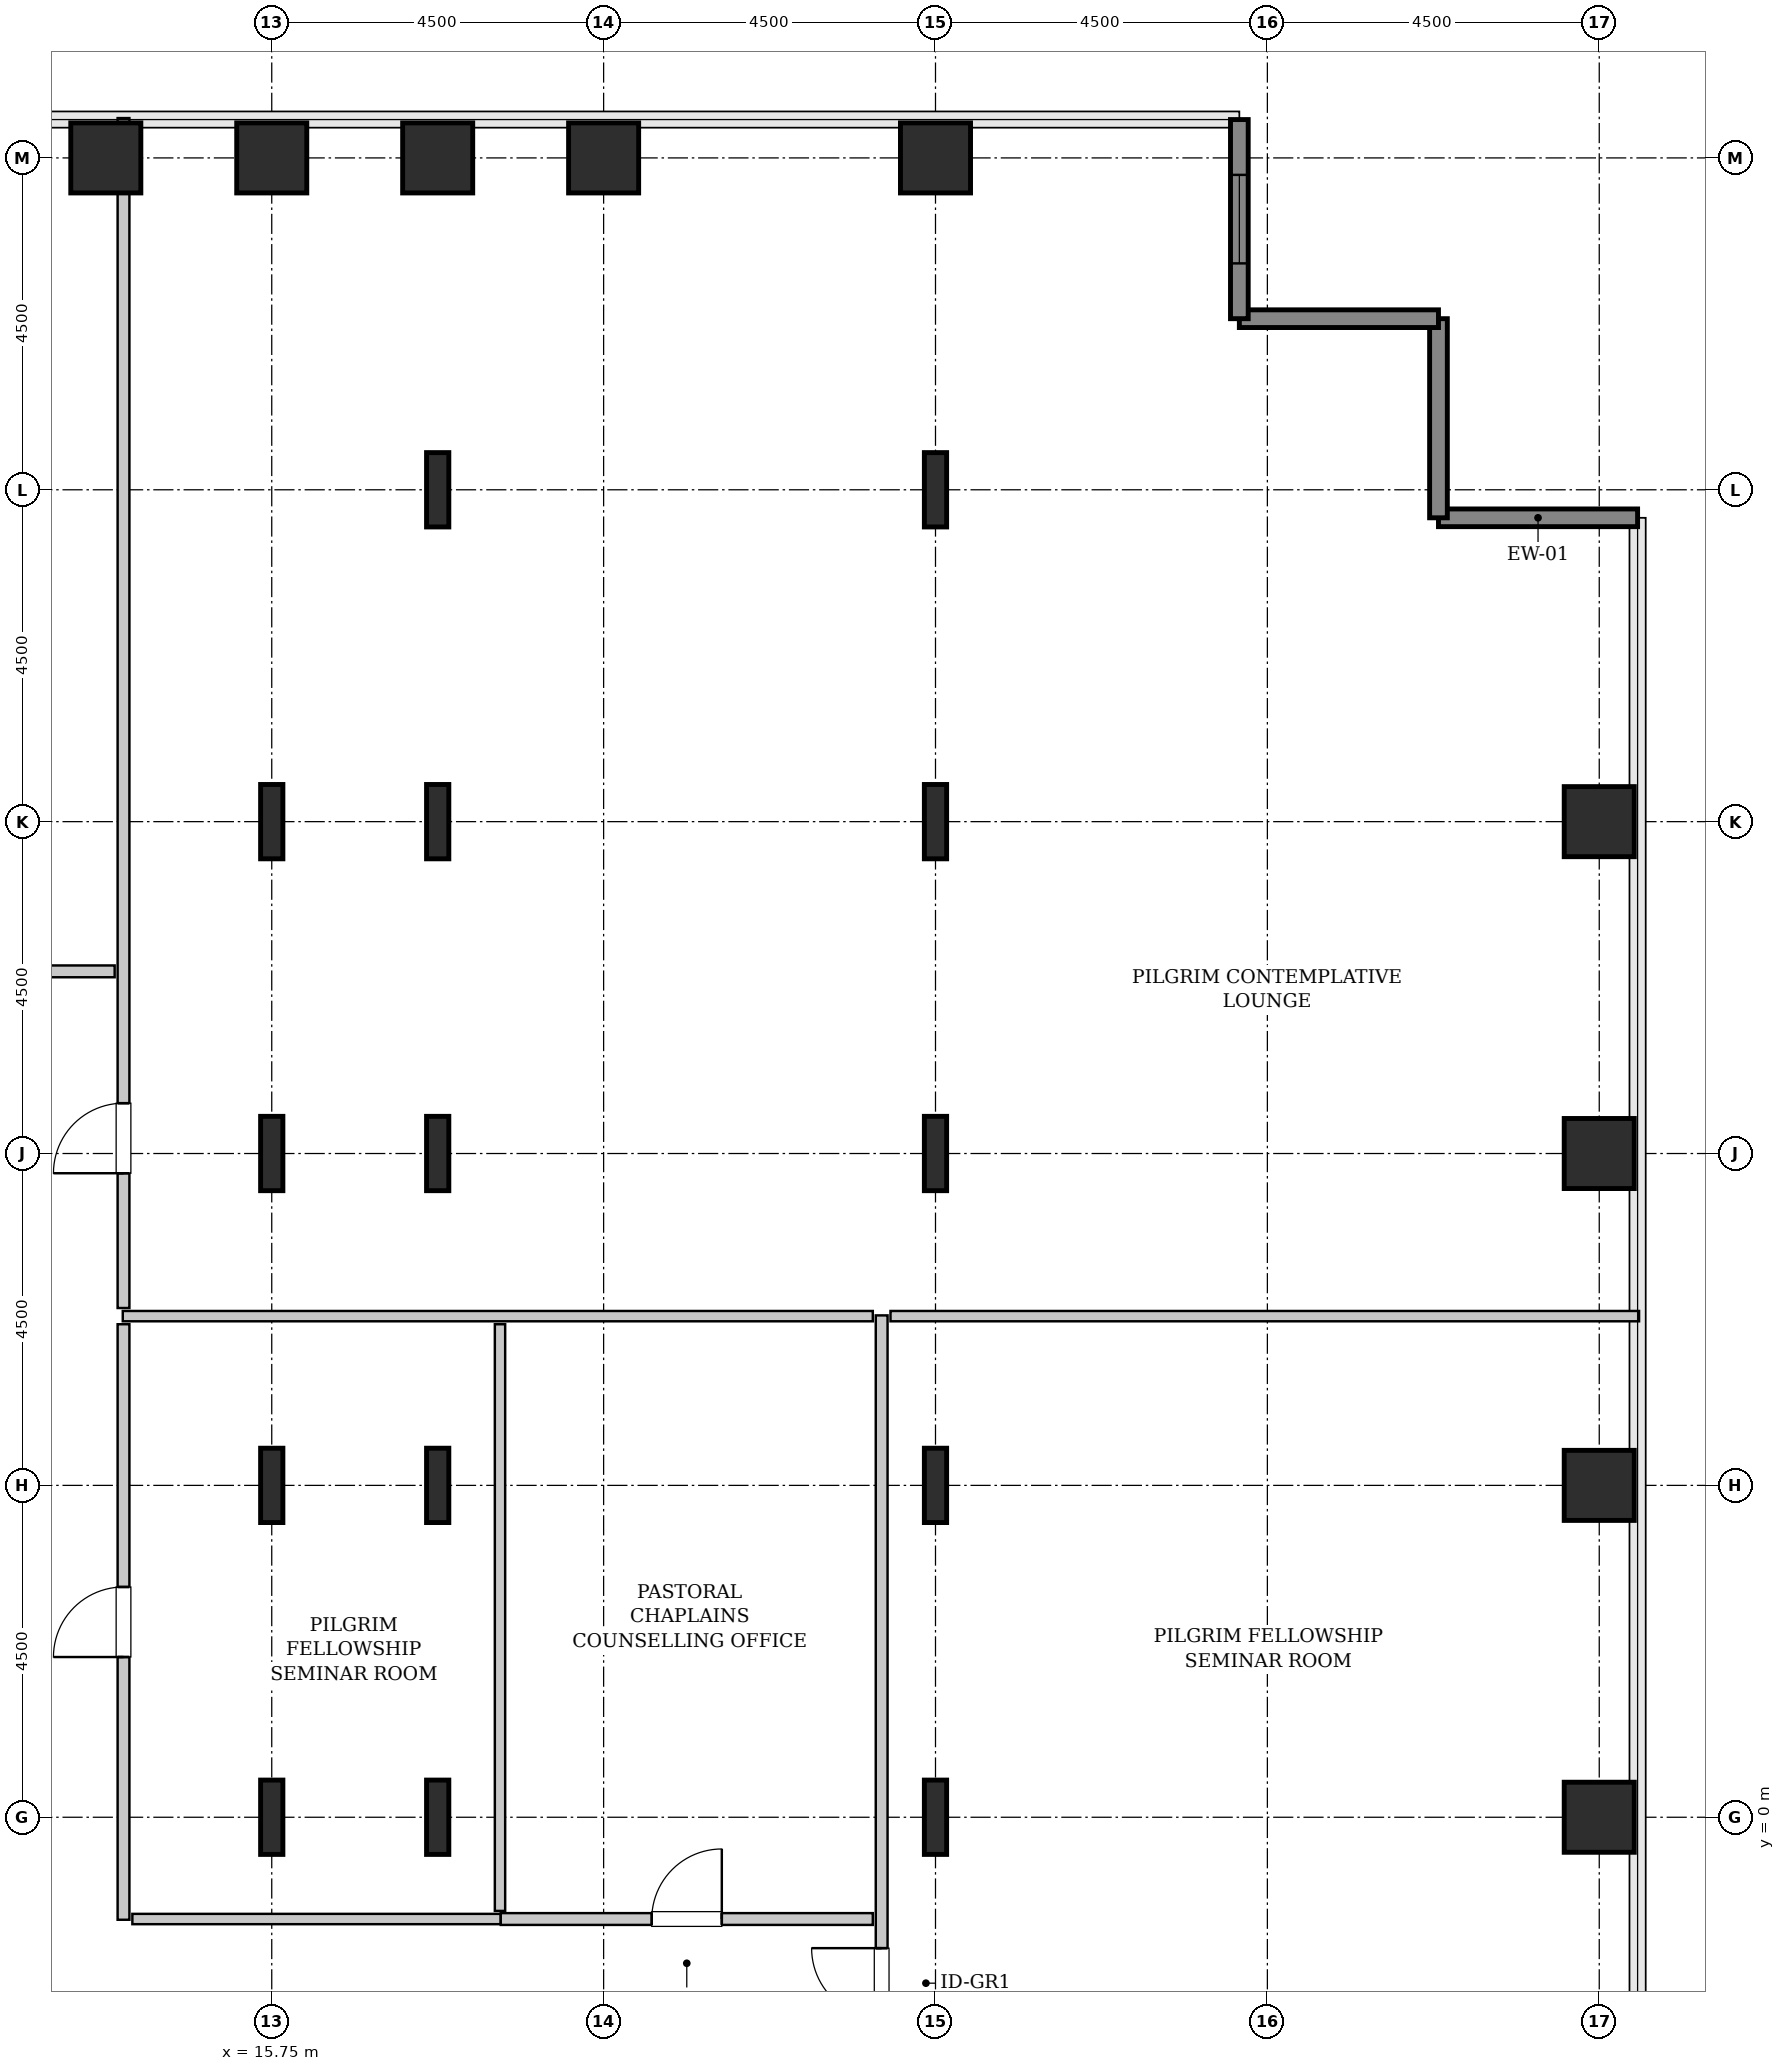
"""IFC4 building model, lengths in metres.
Left out: names, types, materials, properties, quantities, classifications, styles, units other than length and angle.
Written with IfcOpenShell. Run it as: python <this file> out.ifc"""

import sys

from ifc_helpers import new_model, si_unit, direction, frame, frame_2d, origin, origin_2d, place, context, subcontext, project, spatial, rectangle, hollow_rectangle, i_section, extrude, source, transform, mapped, element, fill, save


model = new_model("IFC4")
c1 = context("Model", 3, precision=1e-05, world=origin(), true_north=direction((0.0, 1.0)))
c2 = subcontext(c1, "Body", "Model", "MODEL_VIEW")
j1 = project(units=[si_unit("LENGTHUNIT", "METRE"), si_unit("PLANEANGLEUNIT", "RADIAN")], contexts=[c1])
p1 = place(None, origin())
s1 = spatial("IfcSite", under=j1, at=p1, CompositionType="ELEMENT")
p2 = place(p1, origin())
s2 = spatial("IfcBuilding", under=s1, at=p2, CompositionType="ELEMENT")
p3 = place(p2, frame((0.0, 0.0, 98.4)))
s3 = spatial("IfcBuildingStorey", under=s2, at=p3, CompositionType="ELEMENT", Elevation=98.4)
m1 = source(origin(), c2, "Body", "SweptSolid", [
    extrude(hollow_rectangle(XDim=0.95, YDim=0.95, WallThickness=0.045, InnerFilletRadius=0.045, OuterFilletRadius=0.09, at=origin_2d()), origin(), (0.0, 0.0, 1.0), 3.8),
])
p4 = place(p3, frame((13.5, 22.5, 0.0), z_axis=(0.0, 0.0, 1.0), x_axis=(1.0, 0.0, 0.0)))
e1 = element("IfcColumn", 1, at=p4, inside=s3, PredefinedType="COLUMN", context=c2, shape_type="MappedRepresentation", body=[
    mapped(m1, transform((0.0, 0.0, 0.0), x_axis=(1.0, 0.0, 0.0), y_axis=(0.0, 1.0, 0.0), z_axis=(0.0, 0.0, 1.0), scale=1.0)),
])
m2 = source(origin(), c2, "Body", "SweptSolid", [
    extrude(i_section(OverallWidth=0.302, OverallDepth=1.008, WebThickness=0.021, FlangeThickness=0.04, FilletRadius=0.03, at=origin_2d()), origin(), (0.0, 0.0, 1.0), 3.8),
])
for number, where, z_axis, x_axis in (
    (2, (15.75, 0.0, 0.0), (0.0, 0.0, 1.0), (1.0, 0.0, 0.0)),
    (3, (15.75, 4.5, 0.0), (0.0, 0.0, 1.0), (1.0, 0.0, 0.0)),
    (4, (15.75, 9.0, 0.0), (0.0, 0.0, 1.0), (1.0, 0.0, 0.0)),
    (5, (15.75, 13.5, 0.0), (0.0, 0.0, 1.0), (1.0, 0.0, 0.0)),
):
    element("IfcColumn", number, at=place(p3, frame(where, z_axis=z_axis, x_axis=x_axis)), inside=s3, PredefinedType="COLUMN", context=c2, shape_type="MappedRepresentation", body=[
        mapped(m2, transform((0.0, 0.0, 0.0), x_axis=(1.0, 0.0, 0.0), y_axis=(0.0, 1.0, 0.0), z_axis=(0.0, 0.0, 1.0), scale=1.0)),
    ])
p5 = place(p3, frame((15.75, 22.5, 0.0), z_axis=(0.0, 0.0, 1.0), x_axis=(1.0, 0.0, 0.0)))
e6 = element("IfcColumn", 6, at=p5, inside=s3, PredefinedType="COLUMN", context=c2, shape_type="MappedRepresentation", body=[
    mapped(m1, transform((0.0, 0.0, 0.0), x_axis=(1.0, 0.0, 0.0), y_axis=(0.0, 1.0, 0.0), z_axis=(0.0, 0.0, 1.0), scale=1.0)),
])
for number, where, z_axis, x_axis in (
    (7, (18.0, 0.0, 0.0), (0.0, 0.0, 1.0), (1.0, 0.0, 0.0)),
    (8, (18.0, 4.5, 0.0), (0.0, 0.0, 1.0), (1.0, 0.0, 0.0)),
    (9, (18.0, 9.0, 0.0), (0.0, 0.0, 1.0), (1.0, 0.0, 0.0)),
    (10, (18.0, 13.5, 0.0), (0.0, 0.0, 1.0), (1.0, 0.0, 0.0)),
    (11, (18.0, 18.0, 0.0), (0.0, 0.0, 1.0), (1.0, 0.0, 0.0)),
):
    element("IfcColumn", number, at=place(p3, frame(where, z_axis=z_axis, x_axis=x_axis)), inside=s3, PredefinedType="COLUMN", context=c2, shape_type="MappedRepresentation", body=[
        mapped(m2, transform((0.0, 0.0, 0.0), x_axis=(1.0, 0.0, 0.0), y_axis=(0.0, 1.0, 0.0), z_axis=(0.0, 0.0, 1.0), scale=1.0)),
    ])
for number, where, z_axis, x_axis in (
    (12, (18.0, 22.5, 0.0), (0.0, 0.0, 1.0), (1.0, 0.0, 0.0)),
    (13, (20.25, 22.5, 0.0), (0.0, 0.0, 1.0), (1.0, 0.0, 0.0)),
):
    element("IfcColumn", number, at=place(p3, frame(where, z_axis=z_axis, x_axis=x_axis)), inside=s3, PredefinedType="COLUMN", context=c2, shape_type="MappedRepresentation", body=[
        mapped(m1, transform((0.0, 0.0, 0.0), x_axis=(1.0, 0.0, 0.0), y_axis=(0.0, 1.0, 0.0), z_axis=(0.0, 0.0, 1.0), scale=1.0)),
    ])
for number, where, z_axis, x_axis in (
    (14, (24.75, 0.0, 0.0), (0.0, 0.0, 1.0), (1.0, 0.0, 0.0)),
    (15, (24.75, 4.5, 0.0), (0.0, 0.0, 1.0), (1.0, 0.0, 0.0)),
    (16, (24.75, 9.0, 0.0), (0.0, 0.0, 1.0), (1.0, 0.0, 0.0)),
    (17, (24.75, 13.5, 0.0), (0.0, 0.0, 1.0), (1.0, 0.0, 0.0)),
    (18, (24.75, 18.0, 0.0), (0.0, 0.0, 1.0), (1.0, 0.0, 0.0)),
):
    element("IfcColumn", number, at=place(p3, frame(where, z_axis=z_axis, x_axis=x_axis)), inside=s3, PredefinedType="COLUMN", context=c2, shape_type="MappedRepresentation", body=[
        mapped(m2, transform((0.0, 0.0, 0.0), x_axis=(1.0, 0.0, 0.0), y_axis=(0.0, 1.0, 0.0), z_axis=(0.0, 0.0, 1.0), scale=1.0)),
    ])
for number, where, z_axis, x_axis in (
    (19, (24.75, 22.5, 0.0), (0.0, 0.0, 1.0), (1.0, 0.0, 0.0)),
    (20, (33.75, 0.0, 0.0), (0.0, 0.0, 1.0), (1.0, 0.0, 0.0)),
    (21, (33.75, 4.5, 0.0), (0.0, 0.0, 1.0), (1.0, 0.0, 0.0)),
    (22, (33.75, 9.0, 0.0), (0.0, 0.0, 1.0), (1.0, 0.0, 0.0)),
    (23, (33.75, 13.5, 0.0), (0.0, 0.0, 1.0), (1.0, 0.0, 0.0)),
):
    element("IfcColumn", number, at=place(p3, frame(where, z_axis=z_axis, x_axis=x_axis)), inside=s3, PredefinedType="COLUMN", context=c2, shape_type="MappedRepresentation", body=[
        mapped(m1, transform((0.0, 0.0, 0.0), x_axis=(1.0, 0.0, 0.0), y_axis=(0.0, 1.0, 0.0), z_axis=(0.0, 0.0, 1.0), scale=1.0)),
    ])
m3 = source(origin(), c2, "Body", "SweptSolid", [
    extrude(rectangle(XDim=2.7, YDim=0.24, at=frame_2d((1.35, 0.0))), origin(), (0.0, 0.0, 1.0), 3.55),
])
for number, where, z_axis, x_axis in (
    (24, (34.27, 17.62, 0.0), (0.0, 0.0, 1.0), (-1.0, 0.0, 0.0)),
    (25, (31.57, 17.62, 0.0), (0.0, 0.0, 1.0), (0.0, 1.0, 0.0)),
    (26, (31.57, 20.32, 0.0), (0.0, 0.0, 1.0), (-1.0, 0.0, 0.0)),
):
    element("IfcWall", number, at=place(p3, frame(where, z_axis=z_axis, x_axis=x_axis)), inside=s3, PredefinedType="SHEAR", context=c2, shape_type="MappedRepresentation", body=[
        mapped(m3, transform((0.0, 0.0, 0.0), x_axis=(1.0, 0.0, 0.0), y_axis=(0.0, 1.0, 0.0), z_axis=(0.0, 0.0, 1.0), scale=1.0)),
    ])
p6 = place(p3, frame((28.87, 20.32, 0.0), z_axis=(0.0, 0.0, 1.0), x_axis=(0.0, 1.0, 0.0)))
e27 = element("IfcWall", 27, at=p6, inside=s3, PredefinedType="SHEAR", context=c2, shape_type="MappedRepresentation", body=[
    mapped(m3, transform((0.0, 0.0, 0.0), x_axis=(1.0, 0.0, 0.0), y_axis=(0.0, 1.0, 0.0), z_axis=(0.0, 0.0, 1.0), scale=1.0)),
])
p7 = place(p6, frame((0.75, 0.0, 0.85)))
e28 = element("IfcOpeningElement", 28, at=p7, cuts=e27, PredefinedType="OPENING", context=c2, shape_type="SweptSolid", body=[
    extrude(rectangle(XDim=1.2, YDim=1.8, at=frame_2d((0.6, 0.9))), frame((0.0, 0.13, 0.0), z_axis=(0.0, -1.0, 0.0), x_axis=(1.0, 0.0, 0.0)), (0.0, 0.0, 1.0), 0.26),
])
m4 = source(origin(), c2, "Body", "SweptSolid", [
    extrude(rectangle(XDim=13.5, YDim=0.16, at=frame_2d((6.75, 0.0))), origin(), (0.0, 0.0, 1.0), 3.535),
])
p8 = place(p3, frame((24.02, -6.695, 0.0), z_axis=(0.0, 0.0, 1.0), x_axis=(0.0, 1.0, 0.0)))
e29 = element("IfcWall", 29, at=p8, inside=s3, PredefinedType="PARTITIONING", context=c2, shape_type="MappedRepresentation", body=[
    mapped(m4, transform((0.0, 0.0, 0.0), x_axis=(1.0, 0.0, 0.0), y_axis=(0.0, 1.0, 0.0), z_axis=(0.0, 0.0, 1.0), scale=1.0)),
])
p9 = place(p8, frame((3.97, 0.0, 0.0)))
e30 = element("IfcOpeningElement", 30, at=p9, cuts=e29, PredefinedType="OPENING", context=c2, shape_type="SweptSolid", body=[
    extrude(rectangle(XDim=0.95, YDim=2.1, at=frame_2d((0.475, 1.05))), frame((0.0, 0.09, 0.0), z_axis=(0.0, -1.0, 0.0), x_axis=(1.0, 0.0, 0.0)), (0.0, 0.0, 1.0), 0.18),
])
m5 = source(origin(), c2, "Body", "SweptSolid", [
    extrude(rectangle(XDim=10.17, YDim=0.14, at=frame_2d((5.085, 0.0))), origin(), (0.0, 0.0, 1.0), 3.535),
])
p10 = place(p3, frame((13.73, 6.795, 0.0), z_axis=(0.0, 0.0, 1.0), x_axis=(1.0, 0.0, 0.0)))
e31 = element("IfcWall", 31, at=p10, inside=s3, PredefinedType="PARTITIONING", context=c2, shape_type="MappedRepresentation", body=[
    mapped(m5, transform((0.0, 0.0, 0.0), x_axis=(1.0, 0.0, 0.0), y_axis=(0.0, 1.0, 0.0), z_axis=(0.0, 0.0, 1.0), scale=1.0)),
])
m6 = source(origin(), c2, "Body", "SweptSolid", [
    extrude(rectangle(XDim=10.15, YDim=0.14, at=frame_2d((5.075, 0.0))), origin(), (0.0, 0.0, 1.0), 3.535),
])
p11 = place(p3, frame((24.14, 6.795, 0.0), z_axis=(0.0, 0.0, 1.0), x_axis=(1.0, 0.0, 0.0)))
e32 = element("IfcWall", 32, at=p11, inside=s3, PredefinedType="PARTITIONING", context=c2, shape_type="MappedRepresentation", body=[
    mapped(m6, transform((0.0, 0.0, 0.0), x_axis=(1.0, 0.0, 0.0), y_axis=(0.0, 1.0, 0.0), z_axis=(0.0, 0.0, 1.0), scale=1.0)),
])
m7 = source(origin(), c2, "Body", "SweptSolid", [
    extrude(rectangle(XDim=8.075, YDim=0.16, at=frame_2d((4.038, 0.0))), origin(), (0.0, 0.0, 1.0), 3.535),
])
p12 = place(p3, frame((13.74, -1.39, 0.0), z_axis=(0.0, 0.0, 1.0), x_axis=(0.0, 1.0, 0.0)))
e33 = element("IfcWall", 33, at=p12, inside=s3, PredefinedType="PARTITIONING", context=c2, shape_type="MappedRepresentation", body=[
    mapped(m7, transform((0.0, 0.0, 0.0), x_axis=(1.0, 0.0, 0.0), y_axis=(0.0, 1.0, 0.0), z_axis=(0.0, 0.0, 1.0), scale=1.0)),
])
p13 = place(p12, frame((3.562, 0.0, 0.0)))
e34 = element("IfcOpeningElement", 34, at=p13, cuts=e33, PredefinedType="OPENING", context=c2, shape_type="SweptSolid", body=[
    extrude(rectangle(XDim=0.95, YDim=2.1, at=frame_2d((0.475, 1.05))), frame((0.0, 0.09, 0.0), z_axis=(0.0, -1.0, 0.0), x_axis=(1.0, 0.0, 0.0)), (0.0, 0.0, 1.0), 0.18),
])
m8 = source(origin(), c2, "Body", "SweptSolid", [
    extrude(rectangle(XDim=4.995, YDim=0.14, at=frame_2d((2.498, 0.0))), origin(), (0.0, 0.0, 1.0), 3.535),
])
p14 = place(p3, frame((13.86, -1.38, 0.0), z_axis=(0.0, 0.0, 1.0), x_axis=(1.0, 0.0, 0.0)))
e35 = element("IfcWall", 35, at=p14, inside=s3, PredefinedType="PARTITIONING", context=c2, shape_type="MappedRepresentation", body=[
    mapped(m8, transform((0.0, 0.0, 0.0), x_axis=(1.0, 0.0, 0.0), y_axis=(0.0, 1.0, 0.0), z_axis=(0.0, 0.0, 1.0), scale=1.0)),
])
m9 = source(origin(), c2, "Body", "SweptSolid", [
    extrude(rectangle(XDim=7.955, YDim=0.14, at=frame_2d((3.978, 0.0))), origin(), (0.0, 0.0, 1.0), 3.535),
])
p15 = place(p3, frame((18.845, -1.27, 0.0), z_axis=(0.0, 0.0, 1.0), x_axis=(0.0, 1.0, 0.0)))
e36 = element("IfcWall", 36, at=p15, inside=s3, PredefinedType="PARTITIONING", context=c2, shape_type="MappedRepresentation", body=[
    mapped(m9, transform((0.0, 0.0, 0.0), x_axis=(1.0, 0.0, 0.0), y_axis=(0.0, 1.0, 0.0), z_axis=(0.0, 0.0, 1.0), scale=1.0)),
])
m10 = source(origin(), c2, "Body", "SweptSolid", [
    extrude(rectangle(XDim=5.045, YDim=0.16, at=frame_2d((2.522, 0.0))), origin(), (0.0, 0.0, 1.0), 3.535),
])
p16 = place(p3, frame((18.855, -1.38, 0.0), z_axis=(0.0, 0.0, 1.0), x_axis=(1.0, 0.0, 0.0)))
e37 = element("IfcWall", 37, at=p16, inside=s3, PredefinedType="PARTITIONING", context=c2, shape_type="MappedRepresentation", body=[
    mapped(m10, transform((0.0, 0.0, 0.0), x_axis=(1.0, 0.0, 0.0), y_axis=(0.0, 1.0, 0.0), z_axis=(0.0, 0.0, 1.0), scale=1.0)),
])
p17 = place(p16, frame((2.048, 0.0, 0.0)))
e38 = element("IfcOpeningElement", 38, at=p17, cuts=e37, PredefinedType="OPENING", context=c2, shape_type="SweptSolid", body=[
    extrude(rectangle(XDim=0.95, YDim=2.1, at=frame_2d((0.475, 1.05))), frame((0.0, 0.09, 0.0), z_axis=(0.0, -1.0, 0.0), x_axis=(1.0, 0.0, 0.0)), (0.0, 0.0, 1.0), 0.18),
])
m11 = source(origin(), c2, "Body", "SweptSolid", [
    extrude(rectangle(XDim=16.135, YDim=0.16, at=frame_2d((8.067, 0.0))), origin(), (0.0, 0.0, 1.0), 3.535),
])
p18 = place(p3, frame((13.74, 6.905, 0.0), z_axis=(0.0, 0.0, 1.0), x_axis=(0.0, 1.0, 0.0)))
e39 = element("IfcWall", 39, at=p18, inside=s3, PredefinedType="PARTITIONING", context=c2, shape_type="MappedRepresentation", body=[
    mapped(m11, transform((0.0, 0.0, 0.0), x_axis=(1.0, 0.0, 0.0), y_axis=(0.0, 1.0, 0.0), z_axis=(0.0, 0.0, 1.0), scale=1.0)),
])
p19 = place(p18, frame((1.827, 0.0, 0.0)))
e40 = element("IfcOpeningElement", 40, at=p19, cuts=e39, PredefinedType="OPENING", context=c2, shape_type="SweptSolid", body=[
    extrude(rectangle(XDim=0.95, YDim=2.1, at=frame_2d((0.475, 1.05))), frame((0.0, 0.09, 0.0), z_axis=(0.0, -1.0, 0.0), x_axis=(1.0, 0.0, 0.0)), (0.0, 0.0, 1.0), 0.18),
])
m12 = source(origin(), c2, "Body", "SweptSolid", [
    extrude(rectangle(XDim=5.425, YDim=0.16, at=frame_2d((2.712, 0.0))), origin(), (0.0, 0.0, 1.0), 3.535),
])
p20 = place(p3, frame((8.195, 11.47, 0.0), z_axis=(0.0, 0.0, 1.0), x_axis=(1.0, 0.0, 0.0)))
e41 = element("IfcWall", 41, at=p20, inside=s3, PredefinedType="PARTITIONING", context=c2, shape_type="MappedRepresentation", body=[
    mapped(m12, transform((0.0, 0.0, 0.0), x_axis=(1.0, 0.0, 0.0), y_axis=(0.0, 1.0, 0.0), z_axis=(0.0, 0.0, 1.0), scale=1.0)),
])
p21 = place(p20, frame((2.238, 0.0, 0.0)))
e42 = element("IfcOpeningElement", 42, at=p21, cuts=e41, PredefinedType="OPENING", context=c2, shape_type="SweptSolid", body=[
    extrude(rectangle(XDim=0.95, YDim=2.1, at=frame_2d((0.475, 1.05))), frame((0.0, 0.09, 0.0), z_axis=(0.0, -1.0, 0.0), x_axis=(1.0, 0.0, 0.0)), (0.0, 0.0, 1.0), 0.18),
])
m13 = source(origin(), c2, "Body", "SweptSolid", [
    extrude(rectangle(XDim=1.2, YDim=1.8, at=frame_2d((0.6, 0.9))), frame((0.0, 0.03, 0.0), z_axis=(0.0, -1.0, 0.0), x_axis=(1.0, 0.0, 0.0)), (0.0, 0.0, 1.0), 0.06),
])
p22 = place(p7, origin())
e43 = element("IfcWindow", 43, at=p22, inside=s3, PartitioningType="SINGLE_PANEL", PredefinedType="WINDOW", context=c2, shape_type="MappedRepresentation", body=[
    mapped(m13, transform((0.0, 0.0, 0.0), x_axis=(1.0, 0.0, 0.0), y_axis=(0.0, 1.0, 0.0), z_axis=(0.0, 0.0, 1.0), scale=1.0)),
])
fill(e28, e43)
m14 = source(origin(), c2, "Body", "SweptSolid", [
    extrude(rectangle(XDim=0.95, YDim=2.1, at=frame_2d((0.475, 1.05))), frame((0.0, 0.025, 0.0), z_axis=(0.0, -1.0, 0.0), x_axis=(1.0, 0.0, 0.0)), (0.0, 0.0, 1.0), 0.05),
])
p23 = place(p9, origin())
e44 = element("IfcDoor", 44, at=p23, inside=s3, OperationType="SINGLE_SWING_RIGHT", PredefinedType="DOOR", context=c2, shape_type="MappedRepresentation", body=[
    mapped(m14, transform((0.0, 0.0, 0.0), x_axis=(1.0, 0.0, 0.0), y_axis=(0.0, 1.0, 0.0), z_axis=(0.0, 0.0, 1.0), scale=1.0)),
])
fill(e30, e44)
p24 = place(p13, origin())
e45 = element("IfcDoor", 45, at=p24, inside=s3, OperationType="SINGLE_SWING_LEFT", PredefinedType="DOOR", context=c2, shape_type="MappedRepresentation", body=[
    mapped(m14, transform((0.0, 0.0, 0.0), x_axis=(1.0, 0.0, 0.0), y_axis=(0.0, 1.0, 0.0), z_axis=(0.0, 0.0, 1.0), scale=1.0)),
])
fill(e34, e45)
p25 = place(p17, origin())
e46 = element("IfcDoor", 46, at=p25, inside=s3, OperationType="SINGLE_SWING_RIGHT", PredefinedType="DOOR", context=c2, shape_type="MappedRepresentation", body=[
    mapped(m14, transform((0.0, 0.0, 0.0), x_axis=(1.0, 0.0, 0.0), y_axis=(0.0, 1.0, 0.0), z_axis=(0.0, 0.0, 1.0), scale=1.0)),
])
fill(e38, e46)
p26 = place(p19, origin())
e47 = element("IfcDoor", 47, at=p26, inside=s3, OperationType="SINGLE_SWING_LEFT", PredefinedType="DOOR", context=c2, shape_type="MappedRepresentation", body=[
    mapped(m14, transform((0.0, 0.0, 0.0), x_axis=(1.0, 0.0, 0.0), y_axis=(0.0, 1.0, 0.0), z_axis=(0.0, 0.0, 1.0), scale=1.0)),
])
fill(e40, e47)
save(model, sys.argv[1])
